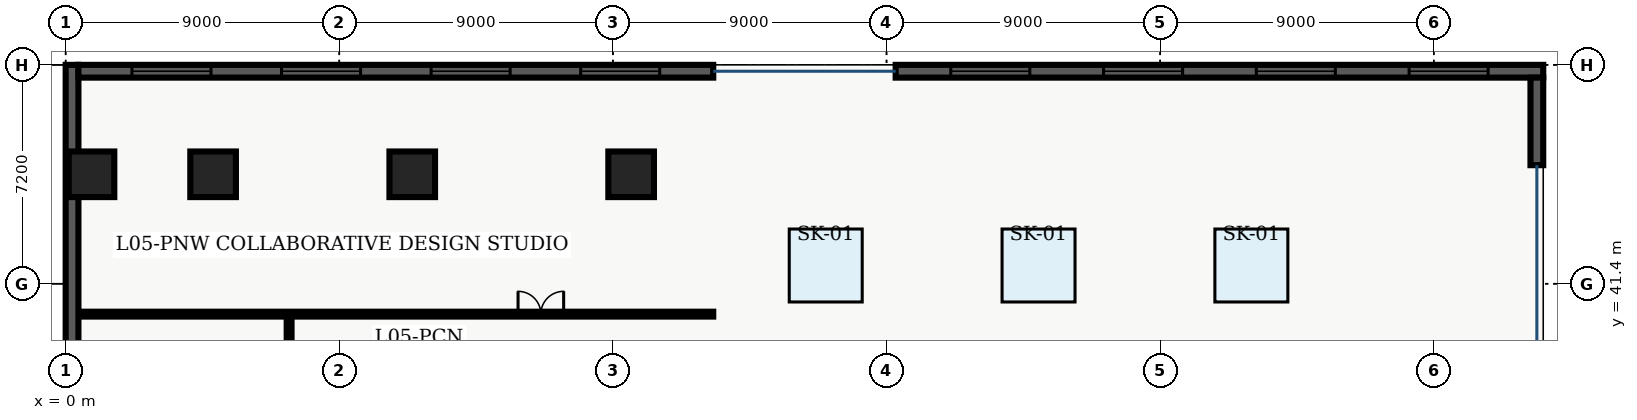
"""IFC4 building model, lengths in metres.
Left out: names, types, materials, properties, quantities, classifications, styles, units other than length and angle.
Written with IfcOpenShell. Run it as: python <this file> out.ifc"""

import sys

from ifc_helpers import new_model, entity, si_unit, converted_unit, direction, frame, origin_with_axes, origin_2d_with_axis, place, context, subcontext, project, spatial, polyline, rectangle, outline, extrude, element, fill, save


model = new_model("IFC4")
c1 = context("Model", 3, precision=1e-05, world=origin_with_axes(), true_north=direction((0.0, 1.0)))
c2 = subcontext(c1, "Body", "Model", "MODEL_VIEW")
j1 = project(units=[si_unit("LENGTHUNIT", "METRE"), converted_unit("PLANEANGLEUNIT", "DEGREE", entity("IfcPlaneAngleMeasure", 0.017), si_unit("PLANEANGLEUNIT", "RADIAN"), dimensions=[0, 0, 0, 0, 0, 0, 0])], contexts=[c1])
p1 = place(None, origin_with_axes())
s1 = spatial("IfcSite", under=j1, at=p1, CompositionType="ELEMENT")
p2 = place(p1, origin_with_axes())
s2 = spatial("IfcBuilding", under=s1, at=p2, CompositionType="ELEMENT")
p3 = place(p2, frame((0.0, 0.0, 24.3), z_axis=(0.0, 0.0, 1.0), x_axis=(1.0, 0.0, 0.0)))
s3 = spatial("IfcBuildingStorey", under=s2, at=p3, CompositionType="ELEMENT", Elevation=24.3)
for number, where, z_axis, x_axis in (
    (1, (11.4, 45.0, 0.0), (0.0, 0.0, 1.0), (1.0, 0.0, 0.0)),
    (2, (18.6, 45.0, 0.0), (0.0, 0.0, 1.0), (1.0, 0.0, 0.0)),
    (3, (4.85, 45.0, 0.0), (0.0, 0.0, 1.0), (1.0, 0.0, 0.0)),
    (4, (0.85, 45.0, 0.0), (0.0, 0.0, 1.0), (1.0, 0.0, 0.0)),
):
    element("IfcColumn", number, at=place(p3, frame(where, z_axis=z_axis, x_axis=x_axis)), inside=s3, PredefinedType="COLUMN", context=c2, shape_type="SweptSolid", body=[
        extrude(rectangle(XDim=1.5, YDim=1.5, at=origin_2d_with_axis()), origin_with_axes(), (0.0, 0.0, 1.0), 4.5),
    ])
p4 = place(p3, frame((0.38, 40.4, 0.0), z_axis=(0.0, 0.0, 1.0), x_axis=(1.0, 0.0, 0.0)))
e5 = element("IfcWall", 5, at=p4, inside=s3, PredefinedType="PARTITIONING", context=c2, shape_type="SweptSolid", body=[
    extrude(outline(polyline([(0.0, -0.08), (20.92, -0.08), (20.92, 0.08), (0.0, 0.08), (0.0, -0.08)])), origin_with_axes(), (0.0, 0.0, 1.0), 3.2),
])
p5 = place(p4, frame((15.25, 0.0, 0.0), z_axis=(0.0, 0.0, 1.0), x_axis=(1.0, 0.0, 0.0)))
e6 = element("IfcOpeningElement", 6, at=p5, cuts=e5, PredefinedType="OPENING", context=c2, shape_type="SweptSolid", body=[
    extrude(rectangle(XDim=1.5, YDim=0.18, at=origin_2d_with_axis()), origin_with_axes(), (0.0, 0.0, 1.0), 2.2),
])
p6 = place(p3, frame((7.35, 7.8, 0.0), z_axis=(0.0, 0.0, 1.0), x_axis=(0.0, 1.0, 0.0)))
e7 = element("IfcWall", 7, at=p6, inside=s3, PredefinedType="PARTITIONING", context=c2, shape_type="SweptSolid", body=[
    extrude(outline(polyline([(0.0, -0.08), (32.6, -0.08), (32.6, 0.08), (0.0, 0.08), (0.0, -0.08)])), origin_with_axes(), (0.0, 0.0, 1.0), 3.2),
])
p7 = place(p6, frame((8.25, 0.0, 0.0), z_axis=(0.0, 0.0, 1.0), x_axis=(1.0, 0.0, 0.0)))
e8 = element("IfcOpeningElement", 8, at=p7, cuts=e7, PredefinedType="OPENING", context=c2, shape_type="SweptSolid", body=[
    extrude(rectangle(XDim=1.5, YDim=0.18, at=origin_2d_with_axis()), origin_with_axes(), (0.0, 0.0, 1.0), 2.2),
])
p8 = place(p6, frame((21.5, 0.0, 0.0), z_axis=(0.0, 0.0, 1.0), x_axis=(1.0, 0.0, 0.0)))
e9 = element("IfcOpeningElement", 9, at=p8, cuts=e7, PredefinedType="OPENING", context=c2, shape_type="SweptSolid", body=[
    extrude(rectangle(XDim=1.0, YDim=0.18, at=origin_2d_with_axis()), origin_with_axes(), (0.0, 0.0, 1.0), 2.15),
])
p9 = place(p3, frame((0.21, 0.42, 0.0), z_axis=(0.0, 0.0, 1.0), x_axis=(0.0, 1.0, 0.0)))
e10 = element("IfcWall", 10, at=p9, inside=s3, PredefinedType="SOLIDWALL", context=c2, shape_type="SweptSolid", body=[
    extrude(outline(polyline([(0.0, -0.21), (48.18, -0.21), (48.18, 0.21), (0.0, 0.21), (0.0, -0.21)])), origin_with_axes(), (0.0, 0.0, 1.0), 4.2),
])
p10 = place(p9, frame((13.65, 0.0, 0.45), z_axis=(0.0, 0.0, 1.0), x_axis=(1.0, 0.0, 0.0)))
e11 = element("IfcOpeningElement", 11, at=p10, cuts=e10, PredefinedType="OPENING", context=c2, shape_type="SweptSolid", body=[
    extrude(rectangle(XDim=2.6, YDim=0.44, at=origin_2d_with_axis()), origin_with_axes(), (0.0, 0.0, 1.0), 2.8),
])
p11 = place(p9, frame((24.09, 0.0, 0.45), z_axis=(0.0, 0.0, 1.0), x_axis=(1.0, 0.0, 0.0)))
e12 = element("IfcOpeningElement", 12, at=p11, cuts=e10, PredefinedType="OPENING", context=c2, shape_type="SweptSolid", body=[
    extrude(rectangle(XDim=2.6, YDim=0.44, at=origin_2d_with_axis()), origin_with_axes(), (0.0, 0.0, 1.0), 2.8),
])
p12 = place(p9, frame((28.46, 0.0, 0.45), z_axis=(0.0, 0.0, 1.0), x_axis=(1.0, 0.0, 0.0)))
e13 = element("IfcOpeningElement", 13, at=p12, cuts=e10, PredefinedType="OPENING", context=c2, shape_type="SweptSolid", body=[
    extrude(rectangle(XDim=2.6, YDim=0.44, at=origin_2d_with_axis()), origin_with_axes(), (0.0, 0.0, 1.0), 2.8),
])
p13 = place(p9, frame((34.53, 0.0, 0.45), z_axis=(0.0, 0.0, 1.0), x_axis=(1.0, 0.0, 0.0)))
e14 = element("IfcOpeningElement", 14, at=p13, cuts=e10, PredefinedType="OPENING", context=c2, shape_type="SweptSolid", body=[
    extrude(rectangle(XDim=2.6, YDim=0.44, at=origin_2d_with_axis()), origin_with_axes(), (0.0, 0.0, 1.0), 2.8),
])
p14 = place(p3, frame((0.42, 48.39, 0.0), z_axis=(0.0, 0.0, 1.0), x_axis=(1.0, 0.0, 0.0)))
e15 = element("IfcWall", 15, at=p14, inside=s3, PredefinedType="SOLIDWALL", context=c2, shape_type="SweptSolid", body=[
    extrude(outline(polyline([(0.0, -0.21), (20.88, -0.21), (20.88, 0.21), (0.0, 0.21), (0.0, -0.21)])), origin_with_axes(), (0.0, 0.0, 1.0), 4.2),
])
p15 = place(p14, frame((3.06, 0.0, 0.45), z_axis=(0.0, 0.0, 1.0), x_axis=(1.0, 0.0, 0.0)))
e16 = element("IfcOpeningElement", 16, at=p15, cuts=e15, PredefinedType="OPENING", context=c2, shape_type="SweptSolid", body=[
    extrude(rectangle(XDim=2.6, YDim=0.44, at=origin_2d_with_axis()), origin_with_axes(), (0.0, 0.0, 1.0), 2.8),
])
p16 = place(p14, frame((7.98, 0.0, 0.45), z_axis=(0.0, 0.0, 1.0), x_axis=(1.0, 0.0, 0.0)))
e17 = element("IfcOpeningElement", 17, at=p16, cuts=e15, PredefinedType="OPENING", context=c2, shape_type="SweptSolid", body=[
    extrude(rectangle(XDim=2.6, YDim=0.44, at=origin_2d_with_axis()), origin_with_axes(), (0.0, 0.0, 1.0), 2.8),
])
p17 = place(p14, frame((12.9, 0.0, 0.45), z_axis=(0.0, 0.0, 1.0), x_axis=(1.0, 0.0, 0.0)))
e18 = element("IfcOpeningElement", 18, at=p17, cuts=e15, PredefinedType="OPENING", context=c2, shape_type="SweptSolid", body=[
    extrude(rectangle(XDim=2.6, YDim=0.44, at=origin_2d_with_axis()), origin_with_axes(), (0.0, 0.0, 1.0), 2.8),
])
p18 = place(p14, frame((17.82, 0.0, 0.45), z_axis=(0.0, 0.0, 1.0), x_axis=(1.0, 0.0, 0.0)))
e19 = element("IfcOpeningElement", 19, at=p18, cuts=e15, PredefinedType="OPENING", context=c2, shape_type="SweptSolid", body=[
    extrude(rectangle(XDim=2.6, YDim=0.44, at=origin_2d_with_axis()), origin_with_axes(), (0.0, 0.0, 1.0), 2.8),
])
p19 = place(p3, frame((27.3, 48.39, 0.0), z_axis=(0.0, 0.0, 1.0), x_axis=(1.0, 0.0, 0.0)))
e20 = element("IfcWall", 20, at=p19, inside=s3, PredefinedType="SOLIDWALL", context=c2, shape_type="SweptSolid", body=[
    extrude(outline(polyline([(0.0, -0.21), (21.3, -0.21), (21.3, 0.21), (0.0, 0.21), (0.0, -0.21)])), origin_with_axes(), (0.0, 0.0, 1.0), 4.2),
])
p20 = place(p19, frame((3.113, 0.0, 0.45), z_axis=(0.0, 0.0, 1.0), x_axis=(1.0, 0.0, 0.0)))
e21 = element("IfcOpeningElement", 21, at=p20, cuts=e20, PredefinedType="OPENING", context=c2, shape_type="SweptSolid", body=[
    extrude(rectangle(XDim=2.6, YDim=0.44, at=origin_2d_with_axis()), origin_with_axes(), (0.0, 0.0, 1.0), 2.8),
])
p21 = place(p19, frame((8.138, 0.0, 0.45), z_axis=(0.0, 0.0, 1.0), x_axis=(1.0, 0.0, 0.0)))
e22 = element("IfcOpeningElement", 22, at=p21, cuts=e20, PredefinedType="OPENING", context=c2, shape_type="SweptSolid", body=[
    extrude(rectangle(XDim=2.6, YDim=0.44, at=origin_2d_with_axis()), origin_with_axes(), (0.0, 0.0, 1.0), 2.8),
])
p22 = place(p19, frame((13.162, 0.0, 0.45), z_axis=(0.0, 0.0, 1.0), x_axis=(1.0, 0.0, 0.0)))
e23 = element("IfcOpeningElement", 23, at=p22, cuts=e20, PredefinedType="OPENING", context=c2, shape_type="SweptSolid", body=[
    extrude(rectangle(XDim=2.6, YDim=0.44, at=origin_2d_with_axis()), origin_with_axes(), (0.0, 0.0, 1.0), 2.8),
])
p23 = place(p19, frame((18.188, 0.0, 0.45), z_axis=(0.0, 0.0, 1.0), x_axis=(1.0, 0.0, 0.0)))
e24 = element("IfcOpeningElement", 24, at=p23, cuts=e20, PredefinedType="OPENING", context=c2, shape_type="SweptSolid", body=[
    extrude(rectangle(XDim=2.6, YDim=0.44, at=origin_2d_with_axis()), origin_with_axes(), (0.0, 0.0, 1.0), 2.8),
])
p24 = place(p3, frame((48.39, 48.18, 0.0), z_axis=(0.0, 0.0, 1.0), x_axis=(0.0, -1.0, 0.0)))
e25 = element("IfcWall", 25, at=p24, inside=s3, PredefinedType="SOLIDWALL", context=c2, shape_type="SweptSolid", body=[
    extrude(outline(polyline([(0.0, -0.21), (2.88, -0.21), (2.88, 0.21), (0.0, 0.21), (0.0, -0.21)])), origin_with_axes(), (0.0, 0.0, 1.0), 4.2),
])
p25 = place(p4, frame((15.25, 0.0, 0.0), z_axis=(0.0, 0.0, 1.0), x_axis=(1.0, 0.0, 0.0)))
e26 = element("IfcDoor", 26, at=p25, inside=s3, OperationType="DOUBLE_DOOR_SINGLE_SWING", PredefinedType="DOOR", context=c2, shape_type="SweptSolid", body=[
    extrude(rectangle(XDim=1.5, YDim=0.09, at=origin_2d_with_axis()), origin_with_axes(), (0.0, 0.0, 1.0), 2.2),
])
fill(e6, e26)
p26 = place(p3, frame((25.0, 42.0, -0.05), z_axis=(0.0, 0.0, 1.0), x_axis=(1.0, 0.0, 0.0)))
e27 = element("IfcWindow", 27, at=p26, inside=s3, PredefinedType="SKYLIGHT", context=c2, shape_type="SweptSolid", body=[
    extrude(rectangle(XDim=2.4, YDim=2.4, at=origin_2d_with_axis()), origin_with_axes(), (0.0, 0.0, 1.0), 0.05),
])
p27 = place(p3, frame((32.0, 42.0, -0.05), z_axis=(0.0, 0.0, 1.0), x_axis=(1.0, 0.0, 0.0)))
e28 = element("IfcWindow", 28, at=p27, inside=s3, PredefinedType="SKYLIGHT", context=c2, shape_type="SweptSolid", body=[
    extrude(rectangle(XDim=2.4, YDim=2.4, at=origin_2d_with_axis()), origin_with_axes(), (0.0, 0.0, 1.0), 0.05),
])
p28 = place(p3, frame((39.0, 42.0, -0.05), z_axis=(0.0, 0.0, 1.0), x_axis=(1.0, 0.0, 0.0)))
e29 = element("IfcWindow", 29, at=p28, inside=s3, PredefinedType="SKYLIGHT", context=c2, shape_type="SweptSolid", body=[
    extrude(rectangle(XDim=2.4, YDim=2.4, at=origin_2d_with_axis()), origin_with_axes(), (0.0, 0.0, 1.0), 0.05),
])
p29 = place(p14, frame((3.06, 0.0, 0.45), z_axis=(0.0, 0.0, 1.0), x_axis=(1.0, 0.0, 0.0)))
e30 = element("IfcWindow", 30, at=p29, inside=s3, PredefinedType="WINDOW", context=c2, shape_type="SweptSolid", body=[
    extrude(rectangle(XDim=2.6, YDim=0.09, at=origin_2d_with_axis()), origin_with_axes(), (0.0, 0.0, 1.0), 2.8),
])
fill(e16, e30)
p30 = place(p14, frame((7.98, 0.0, 0.45), z_axis=(0.0, 0.0, 1.0), x_axis=(1.0, 0.0, 0.0)))
e31 = element("IfcWindow", 31, at=p30, inside=s3, PredefinedType="WINDOW", context=c2, shape_type="SweptSolid", body=[
    extrude(rectangle(XDim=2.6, YDim=0.09, at=origin_2d_with_axis()), origin_with_axes(), (0.0, 0.0, 1.0), 2.8),
])
fill(e17, e31)
p31 = place(p14, frame((12.9, 0.0, 0.45), z_axis=(0.0, 0.0, 1.0), x_axis=(1.0, 0.0, 0.0)))
e32 = element("IfcWindow", 32, at=p31, inside=s3, PredefinedType="WINDOW", context=c2, shape_type="SweptSolid", body=[
    extrude(rectangle(XDim=2.6, YDim=0.09, at=origin_2d_with_axis()), origin_with_axes(), (0.0, 0.0, 1.0), 2.8),
])
fill(e18, e32)
p32 = place(p14, frame((17.82, 0.0, 0.45), z_axis=(0.0, 0.0, 1.0), x_axis=(1.0, 0.0, 0.0)))
e33 = element("IfcWindow", 33, at=p32, inside=s3, PredefinedType="WINDOW", context=c2, shape_type="SweptSolid", body=[
    extrude(rectangle(XDim=2.6, YDim=0.09, at=origin_2d_with_axis()), origin_with_axes(), (0.0, 0.0, 1.0), 2.8),
])
fill(e19, e33)
p33 = place(p19, frame((3.113, 0.0, 0.45), z_axis=(0.0, 0.0, 1.0), x_axis=(1.0, 0.0, 0.0)))
e34 = element("IfcWindow", 34, at=p33, inside=s3, PredefinedType="WINDOW", context=c2, shape_type="SweptSolid", body=[
    extrude(rectangle(XDim=2.6, YDim=0.09, at=origin_2d_with_axis()), origin_with_axes(), (0.0, 0.0, 1.0), 2.8),
])
fill(e21, e34)
p34 = place(p19, frame((8.138, 0.0, 0.45), z_axis=(0.0, 0.0, 1.0), x_axis=(1.0, 0.0, 0.0)))
e35 = element("IfcWindow", 35, at=p34, inside=s3, PredefinedType="WINDOW", context=c2, shape_type="SweptSolid", body=[
    extrude(rectangle(XDim=2.6, YDim=0.09, at=origin_2d_with_axis()), origin_with_axes(), (0.0, 0.0, 1.0), 2.8),
])
fill(e22, e35)
p35 = place(p19, frame((13.162, 0.0, 0.45), z_axis=(0.0, 0.0, 1.0), x_axis=(1.0, 0.0, 0.0)))
e36 = element("IfcWindow", 36, at=p35, inside=s3, PredefinedType="WINDOW", context=c2, shape_type="SweptSolid", body=[
    extrude(rectangle(XDim=2.6, YDim=0.09, at=origin_2d_with_axis()), origin_with_axes(), (0.0, 0.0, 1.0), 2.8),
])
fill(e23, e36)
p36 = place(p19, frame((18.188, 0.0, 0.45), z_axis=(0.0, 0.0, 1.0), x_axis=(1.0, 0.0, 0.0)))
e37 = element("IfcWindow", 37, at=p36, inside=s3, PredefinedType="WINDOW", context=c2, shape_type="SweptSolid", body=[
    extrude(rectangle(XDim=2.6, YDim=0.09, at=origin_2d_with_axis()), origin_with_axes(), (0.0, 0.0, 1.0), 2.8),
])
fill(e24, e37)
save(model, sys.argv[1])
